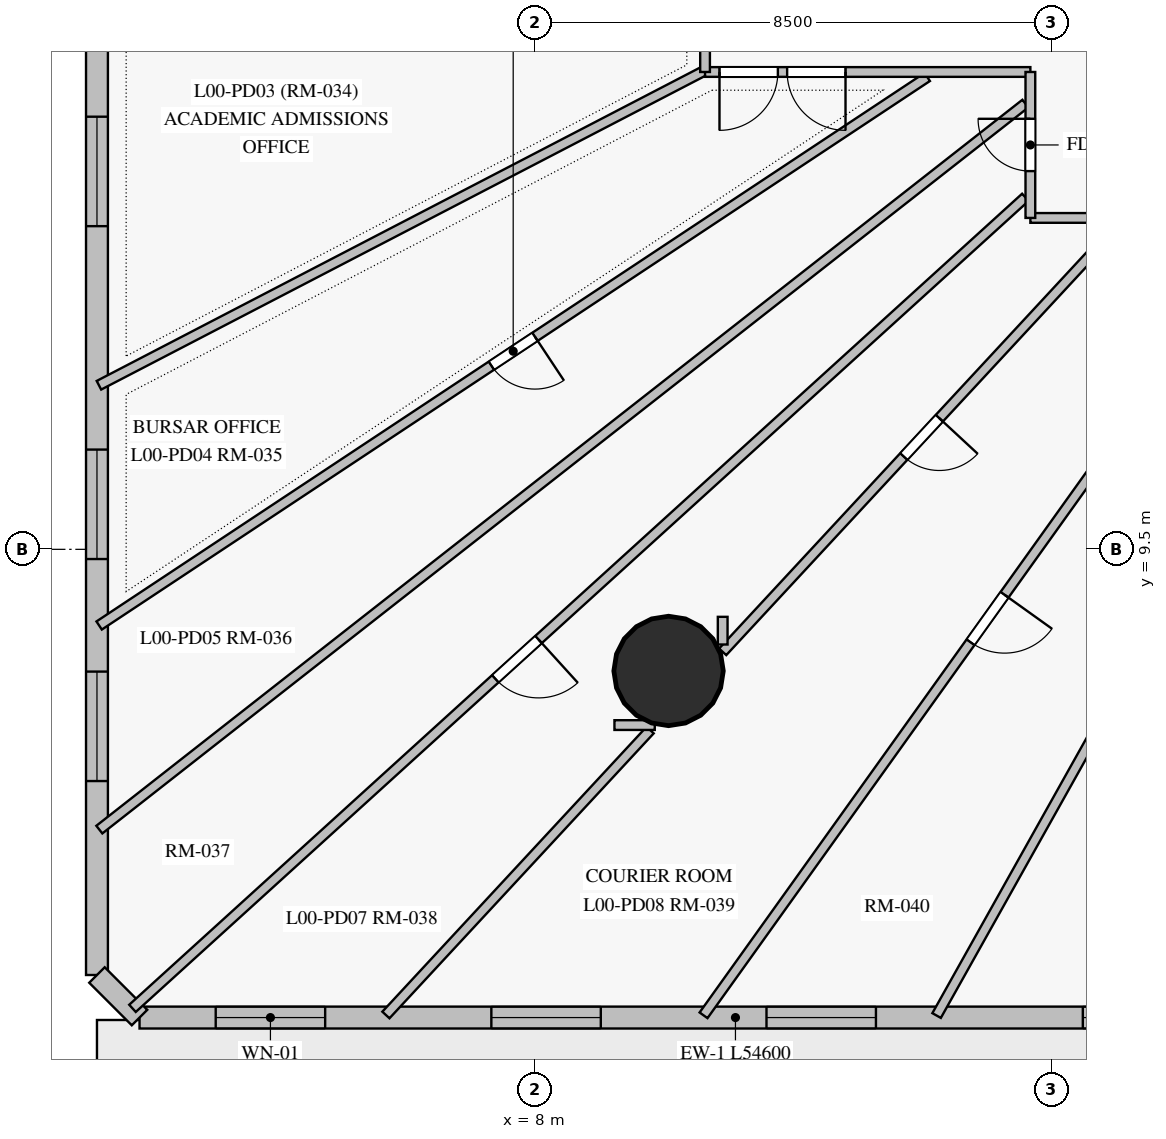
"""IFC4 building model, lengths in metres.
Left out: names, types, materials, properties, quantities, classifications, styles, units other than length and angle.
Written with IfcOpenShell. Run it as: python <this file> out.ifc"""

import sys

from ifc_helpers import new_model, si_unit, direction, frame, frame_2d, origin, origin_with_axes, origin_2d, place, context, subcontext, project, spatial, rectangle, circle, extrude, source, transform, mapped, element, fill, save


model = new_model("IFC4")
c1 = context("Model", 3, precision=1e-05, world=origin(), true_north=direction((0.0, 1.0)))
c2 = subcontext(c1, "Body", "Model", "MODEL_VIEW")
j1 = project(units=[si_unit("LENGTHUNIT", "METRE"), si_unit("PLANEANGLEUNIT", "RADIAN")], contexts=[c1])
p1 = place(None, origin())
s1 = spatial("IfcSite", under=j1, at=p1, CompositionType="ELEMENT")
p2 = place(p1, origin())
s2 = spatial("IfcBuilding", under=s1, at=p2, CompositionType="ELEMENT")
p3 = place(p2, origin())
s3 = spatial("IfcBuildingStorey", under=s2, at=p3, CompositionType="ELEMENT", Elevation=0.0)
m1 = source(origin_with_axes(), c2, "Body", "SweptSolid", [
    extrude(circle(Radius=0.9, at=origin_2d()), origin(), (0.0, 0.0, 1.0), 4.5),
])
p4 = place(p3, frame((10.2, 7.5, 0.0), z_axis=(0.0, 0.0, 1.0), x_axis=(1.0, 0.0, 0.0)))
e1 = element("IfcColumn", 1, at=p4, inside=s3, PredefinedType="COLUMN", context=c2, shape_type="MappedRepresentation", body=[
    mapped(m1, transform((0.0, 0.0, 0.0), scale=1.0)),
])
p5 = place(p3, frame((56.1, 1.8, 0.0), z_axis=(0.0, 0.0, 1.0), x_axis=(-1.0, 0.0, 0.0)))
e2 = element("IfcWall", 2, at=p5, inside=s3, PredefinedType="SOLIDWALL", context=c2, shape_type="SweptSolid", body=[
    extrude(rectangle(XDim=54.6, YDim=0.36, at=frame_2d((27.3, 0.0))), origin(), (0.0, 0.0, 1.0), 4.2),
])
p6 = place(p5, frame((51.547, 0.0, 0.85)))
e3 = element("IfcOpeningElement", 3, at=p6, cuts=e2, PredefinedType="OPENING", context=c2, shape_type="SweptSolid", body=[
    extrude(rectangle(XDim=1.8, YDim=2.2, at=frame_2d((0.9, 1.1))), frame((0.0, 0.19, 0.0), z_axis=(0.0, -1.0, 0.0), x_axis=(1.0, 0.0, 0.0)), (0.0, 0.0, 1.0), 0.38),
])
p7 = place(p5, frame((47.014, 0.0, 0.85)))
e4 = element("IfcOpeningElement", 4, at=p7, cuts=e2, PredefinedType="OPENING", context=c2, shape_type="SweptSolid", body=[
    extrude(rectangle(XDim=1.8, YDim=2.2, at=frame_2d((0.9, 1.1))), frame((0.0, 0.19, 0.0), z_axis=(0.0, -1.0, 0.0), x_axis=(1.0, 0.0, 0.0)), (0.0, 0.0, 1.0), 0.38),
])
p8 = place(p5, frame((42.49, 0.0, 0.85)))
e5 = element("IfcOpeningElement", 5, at=p8, cuts=e2, PredefinedType="OPENING", context=c2, shape_type="SweptSolid", body=[
    extrude(rectangle(XDim=1.8, YDim=2.2, at=frame_2d((0.9, 1.1))), frame((0.0, 0.19, 0.0), z_axis=(0.0, -1.0, 0.0), x_axis=(1.0, 0.0, 0.0)), (0.0, 0.0, 1.0), 0.38),
])
p9 = place(p5, frame((37.288, 0.0, 0.85)))
e6 = element("IfcOpeningElement", 6, at=p9, cuts=e2, PredefinedType="OPENING", context=c2, shape_type="SweptSolid", body=[
    extrude(rectangle(XDim=1.8, YDim=2.2, at=frame_2d((0.9, 1.1))), frame((0.0, 0.19, 0.0), z_axis=(0.0, -1.0, 0.0), x_axis=(1.0, 0.0, 0.0)), (0.0, 0.0, 1.0), 0.38),
])
p10 = place(p5, frame((25.176, 0.0, 0.85)))
e7 = element("IfcOpeningElement", 7, at=p10, cuts=e2, PredefinedType="OPENING", context=c2, shape_type="SweptSolid", body=[
    extrude(rectangle(XDim=1.8, YDim=2.2, at=frame_2d((0.9, 1.1))), frame((0.0, 0.19, 0.0), z_axis=(0.0, -1.0, 0.0), x_axis=(1.0, 0.0, 0.0)), (0.0, 0.0, 1.0), 0.38),
])
p11 = place(p5, frame((17.162, 0.0, 0.85)))
e8 = element("IfcOpeningElement", 8, at=p11, cuts=e2, PredefinedType="OPENING", context=c2, shape_type="SweptSolid", body=[
    extrude(rectangle(XDim=1.8, YDim=2.2, at=frame_2d((0.9, 1.1))), frame((0.0, 0.19, 0.0), z_axis=(0.0, -1.0, 0.0), x_axis=(1.0, 0.0, 0.0)), (0.0, 0.0, 1.0), 0.38),
])
p12 = place(p5, frame((13.244, 0.0, 0.85)))
e9 = element("IfcOpeningElement", 9, at=p12, cuts=e2, PredefinedType="OPENING", context=c2, shape_type="SweptSolid", body=[
    extrude(rectangle(XDim=1.8, YDim=2.2, at=frame_2d((0.9, 1.1))), frame((0.0, 0.19, 0.0), z_axis=(0.0, -1.0, 0.0), x_axis=(1.0, 0.0, 0.0)), (0.0, 0.0, 1.0), 0.38),
])
p13 = place(p5, frame((6.25, 0.0, 0.85)))
e10 = element("IfcOpeningElement", 10, at=p13, cuts=e2, PredefinedType="OPENING", context=c2, shape_type="SweptSolid", body=[
    extrude(rectangle(XDim=1.8, YDim=2.2, at=frame_2d((0.9, 1.1))), frame((0.0, 0.19, 0.0), z_axis=(0.0, -1.0, 0.0), x_axis=(1.0, 0.0, 0.0)), (0.0, 0.0, 1.0), 0.38),
])
p14 = place(p5, frame((1.48, 0.0, 0.85)))
e11 = element("IfcOpeningElement", 11, at=p14, cuts=e2, PredefinedType="OPENING", context=c2, shape_type="SweptSolid", body=[
    extrude(rectangle(XDim=1.8, YDim=2.2, at=frame_2d((0.9, 1.1))), frame((0.0, 0.19, 0.0), z_axis=(0.0, -1.0, 0.0), x_axis=(1.0, 0.0, 0.0)), (0.0, 0.0, 1.0), 0.38),
])
p15 = place(p5, frame((33.2, 0.0, 0.0)))
e12 = element("IfcOpeningElement", 12, at=p15, cuts=e2, PredefinedType="OPENING", context=c2, shape_type="SweptSolid", body=[
    extrude(rectangle(XDim=1.8, YDim=2.3, at=frame_2d((0.9, 1.15))), frame((0.0, 0.19, 0.0), z_axis=(0.0, -1.0, 0.0), x_axis=(1.0, 0.0, 0.0)), (0.0, 0.0, 1.0), 0.38),
])
p16 = place(p5, frame((30.6, 0.0, 0.0)))
e13 = element("IfcOpeningElement", 13, at=p16, cuts=e2, PredefinedType="OPENING", context=c2, shape_type="SweptSolid", body=[
    extrude(rectangle(XDim=1.8, YDim=2.3, at=frame_2d((0.9, 1.15))), frame((0.0, 0.19, 0.0), z_axis=(0.0, -1.0, 0.0), x_axis=(1.0, 0.0, 0.0)), (0.0, 0.0, 1.0), 0.38),
])
p17 = place(p5, frame((10.6, 0.0, 0.0)))
e14 = element("IfcOpeningElement", 14, at=p17, cuts=e2, PredefinedType="OPENING", context=c2, shape_type="SweptSolid", body=[
    extrude(rectangle(XDim=1.8, YDim=2.3, at=frame_2d((0.9, 1.15))), frame((0.0, 0.19, 0.0), z_axis=(0.0, -1.0, 0.0), x_axis=(1.0, 0.0, 0.0)), (0.0, 0.0, 1.0), 0.38),
])
p18 = place(p3, frame((0.8, 2.5, 0.0), z_axis=(0.0, 0.0, 1.0), x_axis=(0.0, 1.0, 0.0)))
e15 = element("IfcWall", 15, at=p18, inside=s3, PredefinedType="SOLIDWALL", context=c2, shape_type="SweptSolid", body=[
    extrude(rectangle(XDim=48.0, YDim=0.36, at=frame_2d((24.0, 0.0))), origin(), (0.0, 0.0, 1.0), 4.2),
])
p19 = place(p18, frame((42.816, 0.0, 0.85)))
e16 = element("IfcOpeningElement", 16, at=p19, cuts=e15, PredefinedType="OPENING", context=c2, shape_type="SweptSolid", body=[
    extrude(rectangle(XDim=1.8, YDim=2.2, at=frame_2d((0.9, 1.1))), frame((0.0, 0.19, 0.0), z_axis=(0.0, -1.0, 0.0), x_axis=(1.0, 0.0, 0.0)), (0.0, 0.0, 1.0), 0.38),
])
p20 = place(p18, frame((38.338, 0.0, 0.85)))
e17 = element("IfcOpeningElement", 17, at=p20, cuts=e15, PredefinedType="OPENING", context=c2, shape_type="SweptSolid", body=[
    extrude(rectangle(XDim=1.8, YDim=2.2, at=frame_2d((0.9, 1.1))), frame((0.0, 0.19, 0.0), z_axis=(0.0, -1.0, 0.0), x_axis=(1.0, 0.0, 0.0)), (0.0, 0.0, 1.0), 0.38),
])
p21 = place(p18, frame((33.194, 0.0, 0.85)))
e18 = element("IfcOpeningElement", 18, at=p21, cuts=e15, PredefinedType="OPENING", context=c2, shape_type="SweptSolid", body=[
    extrude(rectangle(XDim=1.8, YDim=2.2, at=frame_2d((0.9, 1.1))), frame((0.0, 0.19, 0.0), z_axis=(0.0, -1.0, 0.0), x_axis=(1.0, 0.0, 0.0)), (0.0, 0.0, 1.0), 0.38),
])
p22 = place(p18, frame((29.492, 0.0, 0.85)))
e19 = element("IfcOpeningElement", 19, at=p22, cuts=e15, PredefinedType="OPENING", context=c2, shape_type="SweptSolid", body=[
    extrude(rectangle(XDim=1.8, YDim=2.2, at=frame_2d((0.9, 1.1))), frame((0.0, 0.19, 0.0), z_axis=(0.0, -1.0, 0.0), x_axis=(1.0, 0.0, 0.0)), (0.0, 0.0, 1.0), 0.38),
])
p23 = place(p18, frame((24.971, 0.0, 0.85)))
e20 = element("IfcOpeningElement", 20, at=p23, cuts=e15, PredefinedType="OPENING", context=c2, shape_type="SweptSolid", body=[
    extrude(rectangle(XDim=1.8, YDim=2.2, at=frame_2d((0.9, 1.1))), frame((0.0, 0.19, 0.0), z_axis=(0.0, -1.0, 0.0), x_axis=(1.0, 0.0, 0.0)), (0.0, 0.0, 1.0), 0.38),
])
p24 = place(p18, frame((12.315, 0.0, 0.85)))
e21 = element("IfcOpeningElement", 21, at=p24, cuts=e15, PredefinedType="OPENING", context=c2, shape_type="SweptSolid", body=[
    extrude(rectangle(XDim=1.8, YDim=2.2, at=frame_2d((0.9, 1.1))), frame((0.0, 0.19, 0.0), z_axis=(0.0, -1.0, 0.0), x_axis=(1.0, 0.0, 0.0)), (0.0, 0.0, 1.0), 0.38),
])
p25 = place(p18, frame((6.841, 0.0, 0.85)))
e22 = element("IfcOpeningElement", 22, at=p25, cuts=e15, PredefinedType="OPENING", context=c2, shape_type="SweptSolid", body=[
    extrude(rectangle(XDim=1.8, YDim=2.2, at=frame_2d((0.9, 1.1))), frame((0.0, 0.19, 0.0), z_axis=(0.0, -1.0, 0.0), x_axis=(1.0, 0.0, 0.0)), (0.0, 0.0, 1.0), 0.38),
])
p26 = place(p18, frame((3.189, 0.0, 0.85)))
e23 = element("IfcOpeningElement", 23, at=p26, cuts=e15, PredefinedType="OPENING", context=c2, shape_type="SweptSolid", body=[
    extrude(rectangle(XDim=1.8, YDim=2.2, at=frame_2d((0.9, 1.1))), frame((0.0, 0.19, 0.0), z_axis=(0.0, -1.0, 0.0), x_axis=(1.0, 0.0, 0.0)), (0.0, 0.0, 1.0), 0.38),
])
p27 = place(p18, frame((17.2, 0.0, 0.0)))
e24 = element("IfcOpeningElement", 24, at=p27, cuts=e15, PredefinedType="OPENING", context=c2, shape_type="SweptSolid", body=[
    extrude(rectangle(XDim=1.8, YDim=2.3, at=frame_2d((0.9, 1.15))), frame((0.0, 0.19, 0.0), z_axis=(0.0, -1.0, 0.0), x_axis=(1.0, 0.0, 0.0)), (0.0, 0.0, 1.0), 0.38),
])
p28 = place(p3, frame((0.8, 2.5, 0.0), z_axis=(0.0, 0.0, 1.0), x_axis=(0.707106781187, -0.707106781187, 0.0)))
e25 = element("IfcWall", 25, at=p28, inside=s3, PredefinedType="SOLIDWALL", context=c2, shape_type="SweptSolid", body=[
    extrude(rectangle(XDim=0.99, YDim=0.36, at=frame_2d((0.495, 0.0))), origin(), (0.0, 0.0, 1.0), 4.2),
])
p29 = place(p3, frame((16.068, 15.289, 0.0), z_axis=(0.0, 0.0, 1.0), x_axis=(-0.740229029454, -0.672354805109, 0.0)))
e26 = element("IfcWall", 26, at=p29, inside=s3, PredefinedType="PARTITIONING", context=c2, shape_type="SweptSolid", body=[
    extrude(rectangle(XDim=19.837, YDim=0.16, at=frame_2d((9.918, 0.0))), origin(), (0.0, 0.0, 1.0), 3.25),
])
p30 = place(p29, frame((10.816, 0.0, 0.0)))
e27 = element("IfcOpeningElement", 27, at=p30, cuts=e26, PredefinedType="OPENING", context=c2, shape_type="SweptSolid", body=[
    extrude(rectangle(XDim=0.96, YDim=2.15, at=frame_2d((0.48, 1.075))), frame((0.0, 0.09, 0.0), z_axis=(0.0, -1.0, 0.0), x_axis=(1.0, 0.0, 0.0)), (0.0, 0.0, 1.0), 0.18),
])
p31 = place(p3, frame((16.068, 16.83, 0.0), z_axis=(0.0, 0.0, 1.0), x_axis=(-0.786986378296, -0.616970372366, 0.0)))
e28 = element("IfcWall", 28, at=p31, inside=s3, PredefinedType="PARTITIONING", context=c2, shape_type="SweptSolid", body=[
    extrude(rectangle(XDim=19.351, YDim=0.16, at=frame_2d((9.676, 0.0))), origin(), (0.0, 0.0, 1.0), 4.2),
])
p32 = place(p3, frame((14.454, 17.268, 0.0), z_axis=(0.0, 0.0, 1.0), x_axis=(-0.83369067589, -0.55223170584, 0.0)))
e29 = element("IfcWall", 29, at=p32, inside=s3, PredefinedType="PARTITIONING", context=c2, shape_type="SweptSolid", body=[
    extrude(rectangle(XDim=16.335, YDim=0.16, at=frame_2d((8.167, 0.0))), origin(), (0.0, 0.0, 1.0), 4.2),
])
p33 = place(p32, frame((7.737, 0.0, 0.0)))
e30 = element("IfcOpeningElement", 30, at=p33, cuts=e29, PredefinedType="OPENING", context=c2, shape_type="SweptSolid", body=[
    extrude(rectangle(XDim=0.86, YDim=2.04, at=frame_2d((0.43, 1.02))), frame((0.0, 0.09, 0.0), z_axis=(0.0, -1.0, 0.0), x_axis=(1.0, 0.0, 0.0)), (0.0, 0.0, 1.0), 0.18),
])
p34 = place(p3, frame((20.101, 14.868, 0.0), z_axis=(0.0, 0.0, 1.0), x_axis=(-0.581991703878, -0.813194722448, 0.0)))
e31 = element("IfcWall", 31, at=p34, inside=s3, PredefinedType="PARTITIONING", context=c2, shape_type="SweptSolid", body=[
    extrude(rectangle(XDim=16.024, YDim=0.16, at=frame_2d((8.012, 0.0))), origin(), (0.0, 0.0, 1.0), 4.2),
])
p35 = place(p34, frame((7.52, 0.0, 0.0)))
e32 = element("IfcOpeningElement", 32, at=p35, cuts=e31, PredefinedType="OPENING", context=c2, shape_type="SweptSolid", body=[
    extrude(rectangle(XDim=0.96, YDim=2.15, at=frame_2d((0.48, 1.075))), frame((0.0, 0.09, 0.0), z_axis=(0.0, -1.0, 0.0), x_axis=(1.0, 0.0, 0.0)), (0.0, 0.0, 1.0), 0.18),
])
p36 = place(p3, frame((21.118, 13.45, 0.0), z_axis=(0.0, 0.0, 1.0), x_axis=(-0.488869643444, -0.872356848841, 0.0)))
e33 = element("IfcWall", 33, at=p36, inside=s3, PredefinedType="PARTITIONING", context=c2, shape_type="SweptSolid", body=[
    extrude(rectangle(XDim=13.316, YDim=0.16, at=frame_2d((6.658, 0.0))), origin(), (0.0, 0.0, 1.0), 4.2),
])
p37 = place(p3, frame((10.827, 17.389, 0.0), z_axis=(0.0, 0.0, 1.0), x_axis=(-0.8874495265, -0.460904912009, 0.0)))
e34 = element("IfcWall", 34, at=p37, inside=s3, PredefinedType="PARTITIONING", context=c2, shape_type="SweptSolid", body=[
    extrude(rectangle(XDim=11.262, YDim=0.16, at=frame_2d((5.631, 0.0))), origin(), (0.0, 0.0, 1.0), 4.2),
])
p38 = place(p3, frame((17.631, 14.868, 0.0), z_axis=(0.0, 0.0, 1.0), x_axis=(-0.679969088338, -0.733240778261, 0.0)))
e35 = element("IfcWall", 35, at=p38, inside=s3, PredefinedType="PARTITIONING", context=c2, shape_type="SweptSolid", body=[
    extrude(rectangle(XDim=9.62, YDim=0.16, at=frame_2d((4.81, 0.0))), origin(), (0.0, 0.0, 1.0), 3.25),
])
p39 = place(p38, frame((4.38, 0.0, 0.0)))
e36 = element("IfcOpeningElement", 36, at=p39, cuts=e35, PredefinedType="OPENING", context=c2, shape_type="SweptSolid", body=[
    extrude(rectangle(XDim=0.86, YDim=2.04, at=frame_2d((0.43, 1.02))), frame((0.0, 0.09, 0.0), z_axis=(0.0, -1.0, 0.0), x_axis=(1.0, 0.0, 0.0)), (0.0, 0.0, 1.0), 0.18),
])
p40 = place(p3, frame((9.897, 6.528, 0.0), z_axis=(0.0, 0.0, 1.0), x_axis=(-0.679977657187, -0.733232831866, 0.0)))
e37 = element("IfcWall", 37, at=p40, inside=s3, PredefinedType="PARTITIONING", context=c2, shape_type="SweptSolid", body=[
    extrude(rectangle(XDim=6.391, YDim=0.16, at=frame_2d((3.195, 0.0))), origin(), (0.0, 0.0, 1.0), 4.2),
])
p41 = place(p3, frame((16.15, 17.35, 0.0), z_axis=(0.0, 0.0, 1.0), x_axis=(-1.0, 0.0, 0.0)))
e38 = element("IfcWall", 38, at=p41, inside=s3, PredefinedType="PARTITIONING", context=c2, shape_type="SweptSolid", body=[
    extrude(rectangle(XDim=5.35, YDim=0.16, at=frame_2d((2.675, 0.0))), origin(), (0.0, 0.0, 1.0), 4.2),
])
p42 = place(p41, frame((3.04, 0.0, 0.0)))
e39 = element("IfcOpeningElement", 39, at=p42, cuts=e38, PredefinedType="OPENING", context=c2, shape_type="SweptSolid", body=[
    extrude(rectangle(XDim=0.96, YDim=2.15, at=frame_2d((0.48, 1.075))), frame((0.0, 0.09, 0.0), z_axis=(0.0, -1.0, 0.0), x_axis=(1.0, 0.0, 0.0)), (0.0, 0.0, 1.0), 0.18),
])
p43 = place(p41, frame((4.153, 0.0, 0.0)))
e40 = element("IfcOpeningElement", 40, at=p43, cuts=e38, PredefinedType="OPENING", context=c2, shape_type="SweptSolid", body=[
    extrude(rectangle(XDim=0.96, YDim=2.15, at=frame_2d((0.48, 1.075))), frame((0.0, 0.09, 0.0), z_axis=(0.0, -1.0, 0.0), x_axis=(1.0, 0.0, 0.0)), (0.0, 0.0, 1.0), 0.18),
])
p44 = place(p3, frame((21.2, 14.95, 0.0), z_axis=(0.0, 0.0, 1.0), x_axis=(-1.0, 0.0, 0.0)))
e41 = element("IfcWall", 41, at=p44, inside=s3, PredefinedType="PARTITIONING", context=c2, shape_type="SweptSolid", body=[
    extrude(rectangle(XDim=5.05, YDim=0.16, at=frame_2d((2.525, 0.0))), origin(), (0.0, 0.0, 1.0), 4.2),
])
p45 = place(p44, frame((2.05, 0.0, 0.0)))
e42 = element("IfcOpeningElement", 42, at=p45, cuts=e41, PredefinedType="OPENING", context=c2, shape_type="SweptSolid", body=[
    extrude(rectangle(XDim=0.96, YDim=2.15, at=frame_2d((0.48, 1.075))), frame((0.0, 0.09, 0.0), z_axis=(0.0, -1.0, 0.0), x_axis=(1.0, 0.0, 0.0)), (0.0, 0.0, 1.0), 0.18),
])
p46 = place(p3, frame((16.15, 14.95, 0.0), z_axis=(0.0, 0.0, 1.0), x_axis=(0.0, 1.0, 0.0)))
e43 = element("IfcWall", 43, at=p46, inside=s3, PredefinedType="PARTITIONING", context=c2, shape_type="SweptSolid", body=[
    extrude(rectangle(XDim=2.4, YDim=0.16, at=frame_2d((1.2, 0.0))), origin(), (0.0, 0.0, 1.0), 3.25),
])
p47 = place(p46, frame((0.77, 0.0, 0.0)))
e44 = element("IfcOpeningElement", 44, at=p47, cuts=e43, PredefinedType="OPENING", context=c2, shape_type="SweptSolid", body=[
    extrude(rectangle(XDim=0.86, YDim=2.04, at=frame_2d((0.43, 1.02))), frame((0.0, 0.09, 0.0), z_axis=(0.0, -1.0, 0.0), x_axis=(1.0, 0.0, 0.0)), (0.0, 0.0, 1.0), 0.18),
])
p48 = place(p3, frame((10.8, 17.35, 0.0), z_axis=(0.0, 0.0, 1.0), x_axis=(0.0, 1.0, 0.0)))
e45 = element("IfcWall", 45, at=p48, inside=s3, PredefinedType="PARTITIONING", context=c2, shape_type="SweptSolid", body=[
    extrude(rectangle(XDim=2.05, YDim=0.16, at=frame_2d((1.025, 0.0))), origin(), (0.0, 0.0, 1.0), 3.25),
])
p49 = place(p3, frame((9.31, 6.61, 0.0), z_axis=(0.0, 0.0, 1.0), x_axis=(1.0, 0.0, 0.0)))
e46 = element("IfcWall", 46, at=p49, inside=s3, PredefinedType="PARTITIONING", context=c2, shape_type="SweptSolid", body=[
    extrude(rectangle(XDim=0.663, YDim=0.16, at=frame_2d((0.332, 0.0))), origin(), (0.0, 0.0, 1.0), 4.2),
])
p50 = place(p3, frame((11.09, 7.935, 0.0), z_axis=(0.0, 0.0, 1.0), x_axis=(0.0, 1.0, 0.0)))
e47 = element("IfcWall", 47, at=p50, inside=s3, PredefinedType="PARTITIONING", context=c2, shape_type="SweptSolid", body=[
    extrude(rectangle(XDim=0.455, YDim=0.16, at=frame_2d((0.228, 0.0))), origin(), (0.0, 0.0, 1.0), 3.25),
])
m2 = source(origin_with_axes(), c2, "Body", "SweptSolid", [
    extrude(rectangle(XDim=1.8, YDim=2.2, at=frame_2d((0.9, 1.1))), frame((0.0, 0.03, 0.0), z_axis=(0.0, -1.0, 0.0), x_axis=(1.0, 0.0, 0.0)), (0.0, 0.0, 1.0), 0.06),
])
p51 = place(p6, origin())
e48 = element("IfcWindow", 48, at=p51, inside=s3, PartitioningType="SINGLE_PANEL", PredefinedType="WINDOW", context=c2, shape_type="MappedRepresentation", body=[
    mapped(m2, transform((0.0, 0.0, 0.0), scale=1.0)),
])
fill(e3, e48)
p52 = place(p7, origin())
e49 = element("IfcWindow", 49, at=p52, inside=s3, PartitioningType="SINGLE_PANEL", PredefinedType="WINDOW", context=c2, shape_type="MappedRepresentation", body=[
    mapped(m2, transform((0.0, 0.0, 0.0), scale=1.0)),
])
fill(e4, e49)
p53 = place(p8, origin())
e50 = element("IfcWindow", 50, at=p53, inside=s3, PartitioningType="SINGLE_PANEL", PredefinedType="WINDOW", context=c2, shape_type="MappedRepresentation", body=[
    mapped(m2, transform((0.0, 0.0, 0.0), scale=1.0)),
])
fill(e5, e50)
p54 = place(p9, origin())
e51 = element("IfcWindow", 51, at=p54, inside=s3, PartitioningType="SINGLE_PANEL", PredefinedType="WINDOW", context=c2, shape_type="MappedRepresentation", body=[
    mapped(m2, transform((0.0, 0.0, 0.0), scale=1.0)),
])
fill(e6, e51)
p55 = place(p24, origin())
e52 = element("IfcWindow", 52, at=p55, inside=s3, PartitioningType="SINGLE_PANEL", PredefinedType="WINDOW", context=c2, shape_type="MappedRepresentation", body=[
    mapped(m2, transform((0.0, 0.0, 0.0), scale=1.0)),
])
fill(e21, e52)
p56 = place(p25, origin())
e53 = element("IfcWindow", 53, at=p56, inside=s3, PartitioningType="SINGLE_PANEL", PredefinedType="WINDOW", context=c2, shape_type="MappedRepresentation", body=[
    mapped(m2, transform((0.0, 0.0, 0.0), scale=1.0)),
])
fill(e22, e53)
p57 = place(p26, origin())
e54 = element("IfcWindow", 54, at=p57, inside=s3, PartitioningType="SINGLE_PANEL", PredefinedType="WINDOW", context=c2, shape_type="MappedRepresentation", body=[
    mapped(m2, transform((0.0, 0.0, 0.0), scale=1.0)),
])
fill(e23, e54)
m3 = source(origin_with_axes(), c2, "Body", "SweptSolid", [
    extrude(rectangle(XDim=0.96, YDim=2.15, at=frame_2d((0.48, 1.075))), frame((0.0, 0.025, 0.0), z_axis=(0.0, -1.0, 0.0), x_axis=(1.0, 0.0, 0.0)), (0.0, 0.0, 1.0), 0.05),
])
p58 = place(p42, origin())
e55 = element("IfcDoor", 55, at=p58, inside=s3, OperationType="SINGLE_SWING_LEFT", PredefinedType="DOOR", context=c2, shape_type="MappedRepresentation", body=[
    mapped(m3, transform((0.0, 0.0, 0.0), scale=1.0)),
])
fill(e39, e55)
p59 = place(p43, origin())
e56 = element("IfcDoor", 56, at=p59, inside=s3, OperationType="SINGLE_SWING_RIGHT", PredefinedType="DOOR", context=c2, shape_type="MappedRepresentation", body=[
    mapped(m3, transform((0.0, 0.0, 0.0), scale=1.0)),
])
fill(e40, e56)
p60 = place(p30, origin())
e57 = element("IfcDoor", 57, at=p60, inside=s3, OperationType="SINGLE_SWING_LEFT", PredefinedType="DOOR", context=c2, shape_type="MappedRepresentation", body=[
    mapped(m3, transform((0.0, 0.0, 0.0), scale=1.0)),
])
fill(e27, e57)
p61 = place(p35, origin())
e58 = element("IfcDoor", 58, at=p61, inside=s3, OperationType="SINGLE_SWING_LEFT", PredefinedType="DOOR", context=c2, shape_type="MappedRepresentation", body=[
    mapped(m3, transform((0.0, 0.0, 0.0), scale=1.0)),
])
fill(e32, e58)
m4 = source(origin_with_axes(), c2, "Body", "SweptSolid", [
    extrude(rectangle(XDim=0.86, YDim=2.04, at=frame_2d((0.43, 1.02))), frame((0.0, 0.025, 0.0), z_axis=(0.0, -1.0, 0.0), x_axis=(1.0, 0.0, 0.0)), (0.0, 0.0, 1.0), 0.05),
])
p62 = place(p33, origin())
e59 = element("IfcDoor", 59, at=p62, inside=s3, OperationType="SINGLE_SWING_LEFT", PredefinedType="DOOR", context=c2, shape_type="MappedRepresentation", body=[
    mapped(m4, transform((0.0, 0.0, 0.0), scale=1.0)),
])
fill(e30, e59)
p63 = place(p47, origin())
e60 = element("IfcDoor", 60, at=p63, inside=s3, OperationType="SINGLE_SWING_RIGHT", PredefinedType="DOOR", context=c2, shape_type="MappedRepresentation", body=[
    mapped(m4, transform((0.0, 0.0, 0.0), scale=1.0)),
])
fill(e44, e60)
p64 = place(p39, origin())
e61 = element("IfcDoor", 61, at=p64, inside=s3, OperationType="SINGLE_SWING_LEFT", PredefinedType="DOOR", context=c2, shape_type="MappedRepresentation", body=[
    mapped(m4, transform((0.0, 0.0, 0.0), scale=1.0)),
])
fill(e36, e61)
save(model, sys.argv[1])
